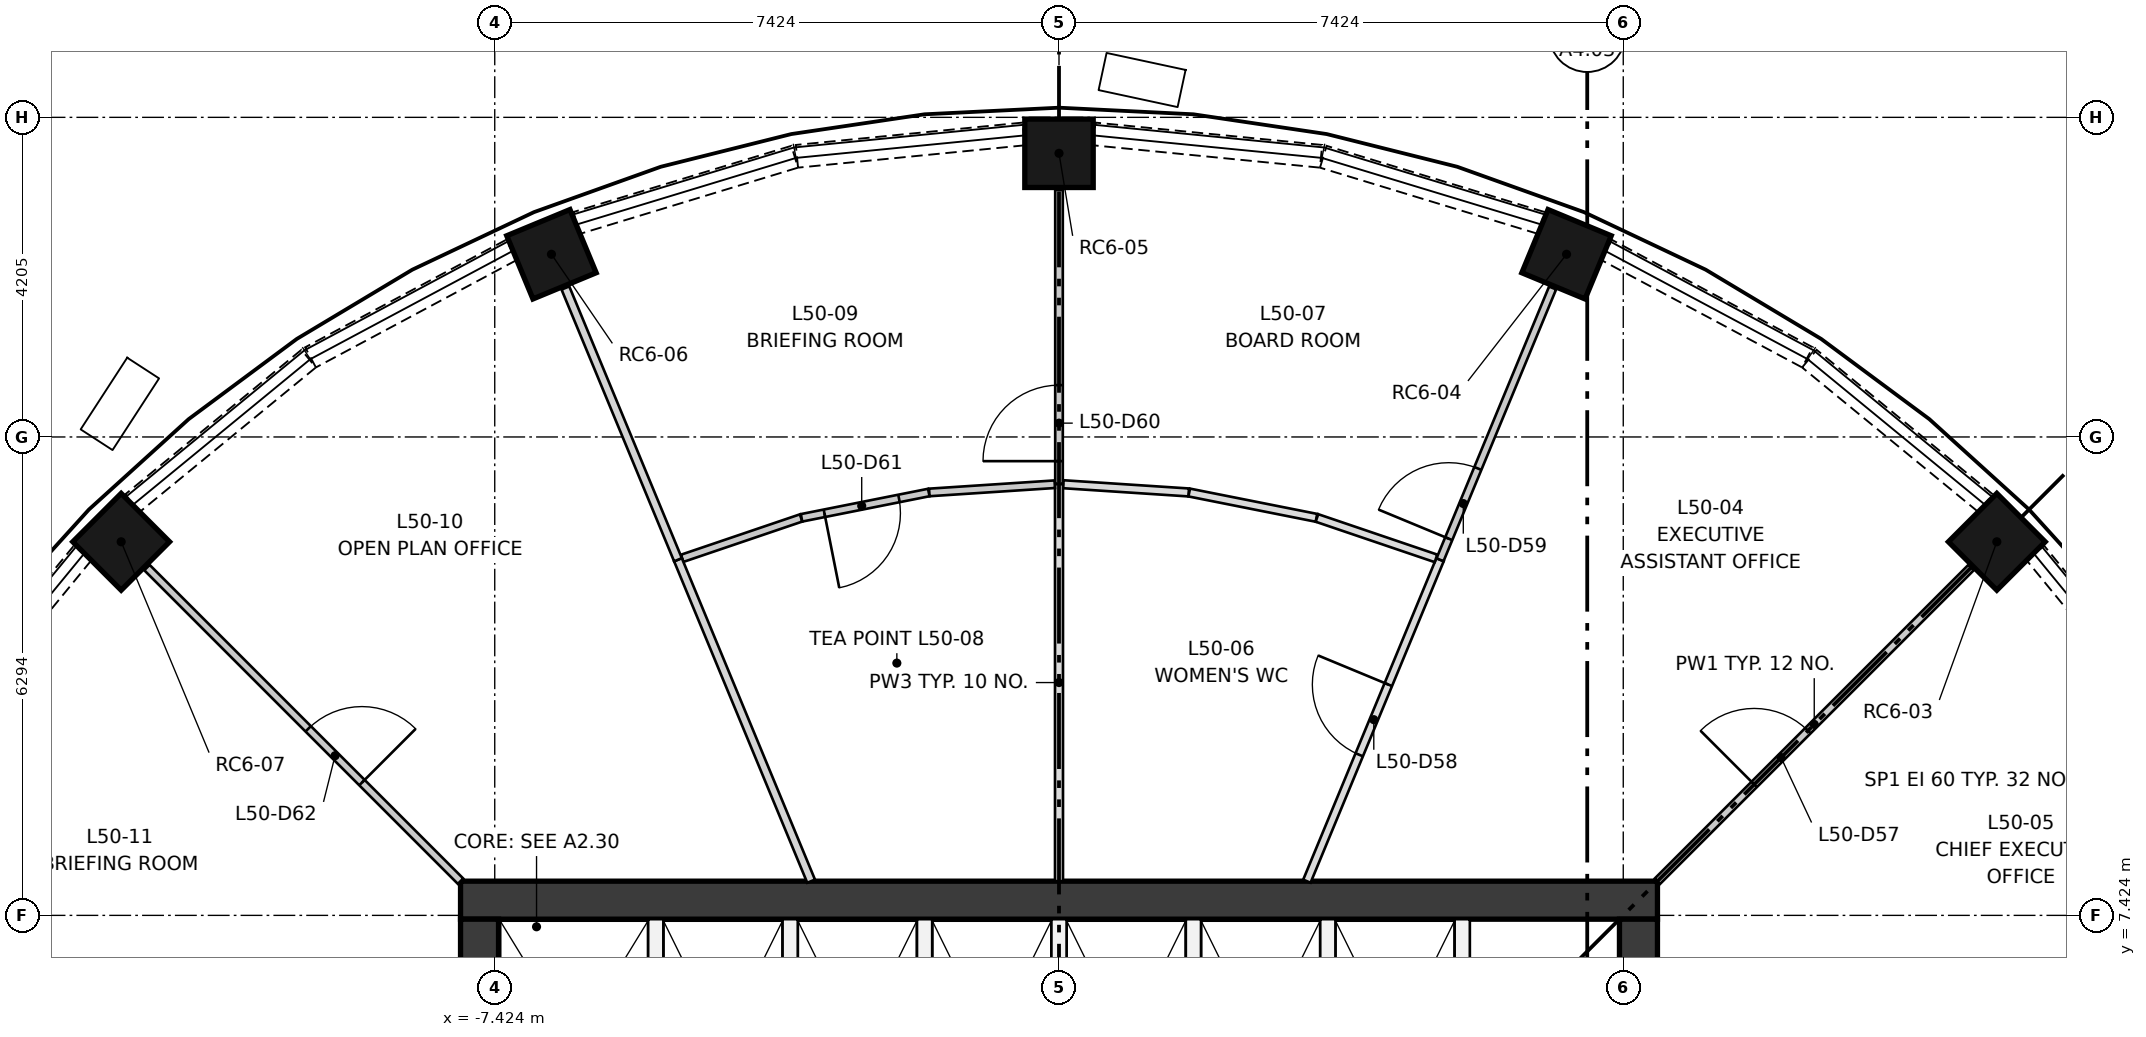
"""IFC4 building model, lengths in metres.
Left out: names, types, materials, properties, quantities, classifications, styles, units other than length and angle.
Written with IfcOpenShell. Run it as: python <this file> out.ifc"""

import sys

from ifc_helpers import new_model, si_unit, direction, frame, frame_2d, origin, origin_2d, place, context, subcontext, project, spatial, rectangle, extrude, element, fill, save


model = new_model("IFC4")
c1 = context("Model", 3, precision=1e-05, world=origin(), true_north=direction((0.0, 1.0)))
c2 = subcontext(c1, "Body", "Model", "MODEL_VIEW")
j1 = project(units=[si_unit("LENGTHUNIT", "METRE"), si_unit("PLANEANGLEUNIT", "RADIAN")], contexts=[c1])
p1 = place(None, origin())
s1 = spatial("IfcSite", under=j1, at=p1, CompositionType="ELEMENT")
p2 = place(p1, origin())
s2 = spatial("IfcBuilding", under=s1, at=p2, CompositionType="ELEMENT")
p3 = place(p2, frame((0.0, 0.0, 187.65)))
s3 = spatial("IfcBuildingStorey", under=s2, at=p3, CompositionType="ELEMENT", Elevation=187.65)
for number, where, z_axis, x_axis in (
    (1, (12.339, 12.339, 0.5), (0.0, 0.0, 1.0), (0.707, 0.707, 0.0)),
    (2, (6.678, 16.122, 0.5), (0.0, 0.0, 1.0), (0.383, 0.924, 0.0)),
    (3, (0.0, 17.45, 0.5), (0.0, 0.0, 1.0), (0.0, 1.0, 0.0)),
    (4, (-6.678, 16.122, 0.5), (0.0, 0.0, 1.0), (-0.383, 0.924, 0.0)),
    (5, (-12.339, 12.339, 0.5), (0.0, 0.0, 1.0), (-0.707, 0.707, 0.0)),
):
    element("IfcColumn", number, at=place(p3, frame(where, z_axis=z_axis, x_axis=x_axis)), inside=s3, PredefinedType="COLUMN", context=c2, shape_type="SweptSolid", body=[
        extrude(rectangle(XDim=0.9, YDim=0.9, at=origin_2d()), origin(), (0.0, 0.0, 1.0), 2.85),
    ])
p4 = place(p3, frame((-7.874, 7.624, 0.0), z_axis=(0.0, 0.0, 1.0), x_axis=(1.0, 0.0, 0.0)))
e6 = element("IfcWall", 6, at=p4, inside=s3, PredefinedType="SHEAR", context=c2, shape_type="SweptSolid", body=[
    extrude(rectangle(XDim=15.748, YDim=0.5, at=frame_2d((7.874, 0.0))), origin(), (0.0, 0.0, 1.0), 3.35),
])
p5 = place(p3, frame((-7.624, -7.374, 0.0), z_axis=(0.0, 0.0, 1.0), x_axis=(0.0, 1.0, 0.0)))
e7 = element("IfcWall", 7, at=p5, inside=s3, PredefinedType="SHEAR", context=c2, shape_type="SweptSolid", body=[
    extrude(rectangle(XDim=14.748, YDim=0.5, at=frame_2d((7.374, 0.0))), origin(), (0.0, 0.0, 1.0), 3.35),
])
p6 = place(p5, frame((6.874, 0.0, 0.0)))
e8 = element("IfcOpeningElement", 8, at=p6, cuts=e7, PredefinedType="OPENING", context=c2, shape_type="SweptSolid", body=[
    extrude(rectangle(XDim=1.0, YDim=2.1, at=frame_2d((0.5, 1.05))), frame((0.0, 0.26, 0.0), z_axis=(0.0, -1.0, 0.0), x_axis=(1.0, 0.0, 0.0)), (0.0, 0.0, 1.0), 0.52),
])
p7 = place(p5, frame((3.75, 0.0, 0.0)))
e9 = element("IfcOpeningElement", 9, at=p7, cuts=e7, PredefinedType="OPENING", context=c2, shape_type="SweptSolid", body=[
    extrude(rectangle(XDim=1.8, YDim=2.1, at=frame_2d((0.9, 1.05))), frame((0.0, 0.26, 0.0), z_axis=(0.0, -1.0, 0.0), x_axis=(1.0, 0.0, 0.0)), (0.0, 0.0, 1.0), 0.52),
])
p8 = place(p5, frame((9.198, 0.0, 0.0)))
e10 = element("IfcOpeningElement", 10, at=p8, cuts=e7, PredefinedType="OPENING", context=c2, shape_type="SweptSolid", body=[
    extrude(rectangle(XDim=1.8, YDim=2.1, at=frame_2d((0.9, 1.05))), frame((0.0, 0.26, 0.0), z_axis=(0.0, -1.0, 0.0), x_axis=(1.0, 0.0, 0.0)), (0.0, 0.0, 1.0), 0.52),
])
p9 = place(p3, frame((7.624, -7.374, 0.0), z_axis=(0.0, 0.0, 1.0), x_axis=(0.0, 1.0, 0.0)))
e11 = element("IfcWall", 11, at=p9, inside=s3, PredefinedType="SHEAR", context=c2, shape_type="SweptSolid", body=[
    extrude(rectangle(XDim=14.748, YDim=0.5, at=frame_2d((7.374, 0.0))), origin(), (0.0, 0.0, 1.0), 3.35),
])
p10 = place(p9, frame((6.874, 0.0, 0.0)))
e12 = element("IfcOpeningElement", 12, at=p10, cuts=e11, PredefinedType="OPENING", context=c2, shape_type="SweptSolid", body=[
    extrude(rectangle(XDim=1.0, YDim=2.1, at=frame_2d((0.5, 1.05))), frame((0.0, 0.26, 0.0), z_axis=(0.0, -1.0, 0.0), x_axis=(1.0, 0.0, 0.0)), (0.0, 0.0, 1.0), 0.52),
])
p11 = place(p9, frame((3.75, 0.0, 0.0)))
e13 = element("IfcOpeningElement", 13, at=p11, cuts=e11, PredefinedType="OPENING", context=c2, shape_type="SweptSolid", body=[
    extrude(rectangle(XDim=1.8, YDim=2.1, at=frame_2d((0.9, 1.05))), frame((0.0, 0.26, 0.0), z_axis=(0.0, -1.0, 0.0), x_axis=(1.0, 0.0, 0.0)), (0.0, 0.0, 1.0), 0.52),
])
p12 = place(p9, frame((9.198, 0.0, 0.0)))
e14 = element("IfcOpeningElement", 14, at=p12, cuts=e11, PredefinedType="OPENING", context=c2, shape_type="SweptSolid", body=[
    extrude(rectangle(XDim=1.8, YDim=2.1, at=frame_2d((0.9, 1.05))), frame((0.0, 0.26, 0.0), z_axis=(0.0, -1.0, 0.0), x_axis=(1.0, 0.0, 0.0)), (0.0, 0.0, 1.0), 0.52),
])
for number, where, z_axis, x_axis in (
    (15, (-5.305, 4.174, 0.0), (0.0, 0.0, 1.0), (0.0, 1.0, 0.0)),
    (16, (-3.537, 4.174, 0.0), (0.0, 0.0, 1.0), (0.0, 1.0, 0.0)),
    (17, (-1.769, 4.174, 0.0), (0.0, 0.0, 1.0), (0.0, 1.0, 0.0)),
    (18, (0.0, 4.174, 0.0), (0.0, 0.0, 1.0), (0.0, 1.0, 0.0)),
    (19, (1.769, 4.174, 0.0), (0.0, 0.0, 1.0), (0.0, 1.0, 0.0)),
    (20, (3.537, 4.174, 0.0), (0.0, 0.0, 1.0), (0.0, 1.0, 0.0)),
    (21, (5.305, 4.174, 0.0), (0.0, 0.0, 1.0), (0.0, 1.0, 0.0)),
):
    element("IfcWall", number, at=place(p3, frame(where, z_axis=z_axis, x_axis=x_axis)), inside=s3, PredefinedType="PARTITIONING", context=c2, shape_type="SweptSolid", body=[
        extrude(rectangle(XDim=3.2, YDim=0.2, at=frame_2d((1.6, 0.0))), origin(), (0.0, 0.0, 1.0), 3.0),
    ])
for number, where, z_axis, x_axis in (
    (22, (14.749, 9.873, 0.0), (0.0, 0.0, 1.0), (-0.634, 0.773, 0.0)),
    (23, (12.191, 12.846, 0.0), (0.0, 0.0, 1.0), (-0.773, 0.634, 0.0)),
):
    element("IfcWall", number, at=place(p3, frame(where, z_axis=z_axis, x_axis=x_axis)), inside=s3, PredefinedType="SOLIDWALL", context=c2, shape_type="SweptSolid", body=[
        extrude(rectangle(XDim=2.999, YDim=0.3, at=frame_2d((1.5, 0.0))), origin(), (0.0, 0.0, 1.0), 0.9),
    ])
p13 = place(p3, frame((9.848, 14.765, 0.0), z_axis=(0.0, 0.0, 1.0), x_axis=(-0.881827169278, 0.471572734074, 0.0)))
e24 = element("IfcWall", 24, at=p13, inside=s3, PredefinedType="SOLIDWALL", context=c2, shape_type="SweptSolid", body=[
    extrude(rectangle(XDim=2.998, YDim=0.3, at=frame_2d((1.499, 0.0))), origin(), (0.0, 0.0, 1.0), 0.9),
])
p14 = place(p3, frame((6.347, 16.533, 0.0), z_axis=(0.0, 0.0, 1.0), x_axis=(-0.95687774785, 0.290490921835, 0.0)))
e25 = element("IfcWall", 25, at=p14, inside=s3, PredefinedType="SOLIDWALL", context=c2, shape_type="SweptSolid", body=[
    extrude(rectangle(XDim=2.999, YDim=0.3, at=frame_2d((1.5, 0.0))), origin(), (0.0, 0.0, 1.0), 0.9),
])
for number, where, z_axis, x_axis in (
    (26, (3.448, 17.41, 0.0), (0.0, 0.0, 1.0), (-0.995, 0.098, 0.0)),
    (27, (-0.464, 17.705, 0.0), (0.0, 0.0, 1.0), (-0.995, -0.098, 0.0)),
):
    element("IfcWall", number, at=place(p3, frame(where, z_axis=z_axis, x_axis=x_axis)), inside=s3, PredefinedType="SOLIDWALL", context=c2, shape_type="SweptSolid", body=[
        extrude(rectangle(XDim=2.999, YDim=0.3, at=frame_2d((1.499, 0.0))), origin(), (0.0, 0.0, 1.0), 0.9),
    ])
p15 = place(p3, frame((-3.477, 17.405, 0.0), z_axis=(0.0, 0.0, 1.0), x_axis=(-0.95687774785, -0.290490921835, 0.0)))
e28 = element("IfcWall", 28, at=p15, inside=s3, PredefinedType="SOLIDWALL", context=c2, shape_type="SweptSolid", body=[
    extrude(rectangle(XDim=2.999, YDim=0.3, at=frame_2d((1.5, 0.0))), origin(), (0.0, 0.0, 1.0), 0.9),
])
p16 = place(p3, frame((-7.204, 16.179, 0.0), z_axis=(0.0, 0.0, 1.0), x_axis=(-0.881827169278, -0.471572734074, 0.0)))
e29 = element("IfcWall", 29, at=p16, inside=s3, PredefinedType="SOLIDWALL", context=c2, shape_type="SweptSolid", body=[
    extrude(rectangle(XDim=2.998, YDim=0.3, at=frame_2d((1.499, 0.0))), origin(), (0.0, 0.0, 1.0), 0.9),
])
for number, where, z_axis, x_axis in (
    (30, (-9.873, 14.749, 0.0), (0.0, 0.0, 1.0), (-0.773, -0.634, 0.0)),
    (31, (-12.846, 12.191, 0.0), (0.0, 0.0, 1.0), (-0.634, -0.773, 0.0)),
):
    element("IfcWall", number, at=place(p3, frame(where, z_axis=z_axis, x_axis=x_axis)), inside=s3, PredefinedType="SOLIDWALL", context=c2, shape_type="SweptSolid", body=[
        extrude(rectangle(XDim=2.999, YDim=0.3, at=frame_2d((1.5, 0.0))), origin(), (0.0, 0.0, 1.0), 0.9),
    ])
p17 = place(p3, frame((7.874, 7.874, 0.0), z_axis=(0.0, 0.0, 1.0), x_axis=(0.707106781187, 0.707106781187, 0.0)))
e32 = element("IfcWall", 32, at=p17, inside=s3, PredefinedType="PARTITIONING", context=c2, shape_type="SweptSolid", body=[
    extrude(rectangle(XDim=5.834, YDim=0.1, at=frame_2d((2.917, 0.0))), origin(), (0.0, 0.0, 1.0), 3.0),
])
p18 = place(p17, frame((1.8, 0.0, 0.0)))
e33 = element("IfcOpeningElement", 33, at=p18, cuts=e32, PredefinedType="OPENING", context=c2, shape_type="SweptSolid", body=[
    extrude(rectangle(XDim=1.0, YDim=2.1, at=frame_2d((0.5, 1.05))), frame((0.0, 0.06, 0.0), z_axis=(0.0, -1.0, 0.0), x_axis=(1.0, 0.0, 0.0)), (0.0, 0.0, 1.0), 0.12),
])
p19 = place(p3, frame((3.261, 7.874, 0.0), z_axis=(0.0, 0.0, 1.0), x_axis=(0.382701956612, 0.923871859299, 0.0)))
e34 = element("IfcWall", 34, at=p19, inside=s3, PredefinedType="PARTITIONING", context=c2, shape_type="SweptSolid", body=[
    extrude(rectangle(XDim=4.577, YDim=0.105, at=frame_2d((2.289, 0.0))), origin(), (0.0, 0.0, 1.0), 3.0),
])
p20 = place(p19, frame((1.8, 0.0, 0.0)))
e35 = element("IfcOpeningElement", 35, at=p20, cuts=e34, PredefinedType="OPENING", context=c2, shape_type="SweptSolid", body=[
    extrude(rectangle(XDim=1.0, YDim=2.1, at=frame_2d((0.5, 1.05))), frame((0.0, 0.062, 0.0), z_axis=(0.0, -1.0, 0.0), x_axis=(1.0, 0.0, 0.0)), (0.0, 0.0, 1.0), 0.125),
])
p21 = place(p3, frame((5.013, 12.103, 0.0), z_axis=(0.0, 0.0, 1.0), x_axis=(0.382674944996, 0.923883048049, 0.0)))
e36 = element("IfcWall", 36, at=p21, inside=s3, PredefinedType="PARTITIONING", context=c2, shape_type="SweptSolid", body=[
    extrude(rectangle(XDim=3.87, YDim=0.1, at=frame_2d((1.935, 0.0))), origin(), (0.0, 0.0, 1.0), 3.0),
])
p22 = place(p21, frame((0.3, 0.0, 0.0)))
e37 = element("IfcOpeningElement", 37, at=p22, cuts=e36, PredefinedType="OPENING", context=c2, shape_type="SweptSolid", body=[
    extrude(rectangle(XDim=1.0, YDim=2.1, at=frame_2d((0.5, 1.05))), frame((0.0, 0.06, 0.0), z_axis=(0.0, -1.0, 0.0), x_axis=(1.0, 0.0, 0.0)), (0.0, 0.0, 1.0), 0.12),
])
p23 = place(p3, frame((0.056, 13.096, 0.0), z_axis=(0.0, 0.0, 1.0), x_axis=(0.997860265299, -0.06538265013, 0.0)))
e38 = element("IfcWall", 38, at=p23, inside=s3, PredefinedType="PARTITIONING", context=c2, shape_type="SweptSolid", body=[
    extrude(rectangle(XDim=1.654, YDim=0.105, at=frame_2d((0.827, 0.0))), origin(), (0.0, 0.0, 1.0), 3.0),
])
p24 = place(p3, frame((1.713, 12.987, 0.0), z_axis=(0.0, 0.0, 1.0), x_axis=(0.980778250333, -0.195125661239, 0.0)))
e39 = element("IfcWall", 39, at=p24, inside=s3, PredefinedType="PARTITIONING", context=c2, shape_type="SweptSolid", body=[
    extrude(rectangle(XDim=1.707, YDim=0.105, at=frame_2d((0.853, 0.0))), origin(), (0.0, 0.0, 1.0), 3.0),
])
p25 = place(p3, frame((3.394, 12.653, 0.0), z_axis=(0.0, 0.0, 1.0), x_axis=(0.946927367808, -0.321447600855, 0.0)))
e40 = element("IfcWall", 40, at=p25, inside=s3, PredefinedType="PARTITIONING", context=c2, shape_type="SweptSolid", body=[
    extrude(rectangle(XDim=1.654, YDim=0.105, at=frame_2d((0.827, 0.0))), origin(), (0.0, 0.0, 1.0), 3.0),
])
p26 = place(p3, frame((0.0, 7.874, 0.0), z_axis=(0.0, 0.0, 1.0), x_axis=(0.0, 1.0, 0.0)))
e41 = element("IfcWall", 41, at=p26, inside=s3, PredefinedType="PARTITIONING", context=c2, shape_type="SweptSolid", body=[
    extrude(rectangle(XDim=5.226, YDim=0.105, at=frame_2d((2.613, 0.0))), origin(), (0.0, 0.0, 1.0), 3.0),
])
p27 = place(p3, frame((0.0, 13.1, 0.0), z_axis=(0.0, 0.0, 1.0), x_axis=(0.0, 1.0, 0.0)))
e42 = element("IfcWall", 42, at=p27, inside=s3, PredefinedType="PARTITIONING", context=c2, shape_type="SweptSolid", body=[
    extrude(rectangle(XDim=3.87, YDim=0.1, at=frame_2d((1.935, 0.0))), origin(), (0.0, 0.0, 1.0), 3.0),
])
p28 = place(p27, frame((0.3, 0.0, 0.0)))
e43 = element("IfcOpeningElement", 43, at=p28, cuts=e42, PredefinedType="OPENING", context=c2, shape_type="SweptSolid", body=[
    extrude(rectangle(XDim=1.0, YDim=2.1, at=frame_2d((0.5, 1.05))), frame((0.0, 0.06, 0.0), z_axis=(0.0, -1.0, 0.0), x_axis=(1.0, 0.0, 0.0)), (0.0, 0.0, 1.0), 0.12),
])
p29 = place(p3, frame((-4.958, 12.122, 0.0), z_axis=(0.0, 0.0, 1.0), x_axis=(0.94694015461, 0.321409930755, 0.0)))
e44 = element("IfcWall", 44, at=p29, inside=s3, PredefinedType="PARTITIONING", context=c2, shape_type="SweptSolid", body=[
    extrude(rectangle(XDim=1.652, YDim=0.1, at=frame_2d((0.826, 0.0))), origin(), (0.0, 0.0, 1.0), 3.0),
])
p30 = place(p3, frame((-1.713, 12.987, 0.0), z_axis=(0.0, 0.0, 1.0), x_axis=(-0.980783695828, -0.195098288043, 0.0)))
e45 = element("IfcWall", 45, at=p30, inside=s3, PredefinedType="PARTITIONING", context=c2, shape_type="SweptSolid", body=[
    extrude(rectangle(XDim=1.707, YDim=0.1, at=frame_2d((0.854, 0.0))), origin(), (0.0, 0.0, 1.0), 3.0),
])
p31 = place(p30, frame((0.4, 0.0, 0.0)))
e46 = element("IfcOpeningElement", 46, at=p31, cuts=e45, PredefinedType="OPENING", context=c2, shape_type="SweptSolid", body=[
    extrude(rectangle(XDim=1.0, YDim=2.1, at=frame_2d((0.5, 1.05))), frame((0.0, 0.06, 0.0), z_axis=(0.0, -1.0, 0.0), x_axis=(1.0, 0.0, 0.0)), (0.0, 0.0, 1.0), 0.12),
])
p32 = place(p3, frame((-1.707, 12.988, 0.0), z_axis=(0.0, 0.0, 1.0), x_axis=(0.997860265299, 0.06538265013, 0.0)))
e47 = element("IfcWall", 47, at=p32, inside=s3, PredefinedType="PARTITIONING", context=c2, shape_type="SweptSolid", body=[
    extrude(rectangle(XDim=1.654, YDim=0.1, at=frame_2d((0.827, 0.0))), origin(), (0.0, 0.0, 1.0), 3.0),
])
p33 = place(p3, frame((-3.261, 7.874, 0.0), z_axis=(0.0, 0.0, 1.0), x_axis=(-0.382701956612, 0.923871859299, 0.0)))
e48 = element("IfcWall", 48, at=p33, inside=s3, PredefinedType="PARTITIONING", context=c2, shape_type="SweptSolid", body=[
    extrude(rectangle(XDim=4.577, YDim=0.11, at=frame_2d((2.289, 0.0))), origin(), (0.0, 0.0, 1.0), 3.0),
])
p34 = place(p3, frame((-5.013, 12.103, 0.0), z_axis=(0.0, 0.0, 1.0), x_axis=(-0.382674944996, 0.923883048049, 0.0)))
e49 = element("IfcWall", 49, at=p34, inside=s3, PredefinedType="PARTITIONING", context=c2, shape_type="SweptSolid", body=[
    extrude(rectangle(XDim=3.87, YDim=0.11, at=frame_2d((1.935, 0.0))), origin(), (0.0, 0.0, 1.0), 3.0),
])
p35 = place(p3, frame((-12.0, 12.0, 0.0), z_axis=(0.0, 0.0, 1.0), x_axis=(0.707106781187, -0.707106781187, 0.0)))
e50 = element("IfcWall", 50, at=p35, inside=s3, PredefinedType="PARTITIONING", context=c2, shape_type="SweptSolid", body=[
    extrude(rectangle(XDim=5.834, YDim=0.1, at=frame_2d((2.917, 0.0))), origin(), (0.0, 0.0, 1.0), 3.0),
])
p36 = place(p35, frame((3.0, 0.0, 0.0)))
e51 = element("IfcOpeningElement", 51, at=p36, cuts=e50, PredefinedType="OPENING", context=c2, shape_type="SweptSolid", body=[
    extrude(rectangle(XDim=1.0, YDim=2.1, at=frame_2d((0.5, 1.05))), frame((0.0, 0.06, 0.0), z_axis=(0.0, -1.0, 0.0), x_axis=(1.0, 0.0, 0.0)), (0.0, 0.0, 1.0), 0.12),
])
p37 = place(p18, origin())
e52 = element("IfcDoor", 52, at=p37, inside=s3, OperationType="SINGLE_SWING_LEFT", PredefinedType="DOOR", context=c2, shape_type="SweptSolid", body=[
    extrude(rectangle(XDim=1.0, YDim=2.1, at=frame_2d((0.5, 1.05))), frame((0.0, 0.025, 0.0), z_axis=(0.0, -1.0, 0.0), x_axis=(1.0, 0.0, 0.0)), (0.0, 0.0, 1.0), 0.05),
])
fill(e33, e52)
p38 = place(p20, origin())
e53 = element("IfcDoor", 53, at=p38, inside=s3, OperationType="SINGLE_SWING_RIGHT", PredefinedType="DOOR", context=c2, shape_type="SweptSolid", body=[
    extrude(rectangle(XDim=1.0, YDim=2.1, at=frame_2d((0.5, 1.05))), frame((0.0, 0.025, 0.0), z_axis=(0.0, -1.0, 0.0), x_axis=(1.0, 0.0, 0.0)), (0.0, 0.0, 1.0), 0.05),
])
fill(e35, e53)
p39 = place(p22, origin())
e54 = element("IfcDoor", 54, at=p39, inside=s3, OperationType="SINGLE_SWING_LEFT", PredefinedType="DOOR", context=c2, shape_type="SweptSolid", body=[
    extrude(rectangle(XDim=1.0, YDim=2.1, at=frame_2d((0.5, 1.05))), frame((0.0, 0.025, 0.0), z_axis=(0.0, -1.0, 0.0), x_axis=(1.0, 0.0, 0.0)), (0.0, 0.0, 1.0), 0.05),
])
fill(e37, e54)
p40 = place(p28, origin())
e55 = element("IfcDoor", 55, at=p40, inside=s3, OperationType="SINGLE_SWING_LEFT", PredefinedType="DOOR", context=c2, shape_type="SweptSolid", body=[
    extrude(rectangle(XDim=1.0, YDim=2.1, at=frame_2d((0.5, 1.05))), frame((0.0, 0.025, 0.0), z_axis=(0.0, -1.0, 0.0), x_axis=(1.0, 0.0, 0.0)), (0.0, 0.0, 1.0), 0.05),
])
fill(e43, e55)
p41 = place(p31, origin())
e56 = element("IfcDoor", 56, at=p41, inside=s3, OperationType="SINGLE_SWING_RIGHT", PredefinedType="DOOR", context=c2, shape_type="SweptSolid", body=[
    extrude(rectangle(XDim=1.0, YDim=2.1, at=frame_2d((0.5, 1.05))), frame((0.0, 0.025, 0.0), z_axis=(0.0, -1.0, 0.0), x_axis=(1.0, 0.0, 0.0)), (0.0, 0.0, 1.0), 0.05),
])
fill(e46, e56)
p42 = place(p36, origin())
e57 = element("IfcDoor", 57, at=p42, inside=s3, OperationType="SINGLE_SWING_RIGHT", PredefinedType="DOOR", context=c2, shape_type="SweptSolid", body=[
    extrude(rectangle(XDim=1.0, YDim=2.1, at=frame_2d((0.5, 1.05))), frame((0.0, 0.025, 0.0), z_axis=(0.0, -1.0, 0.0), x_axis=(1.0, 0.0, 0.0)), (0.0, 0.0, 1.0), 0.05),
])
fill(e51, e57)
save(model, sys.argv[1])
